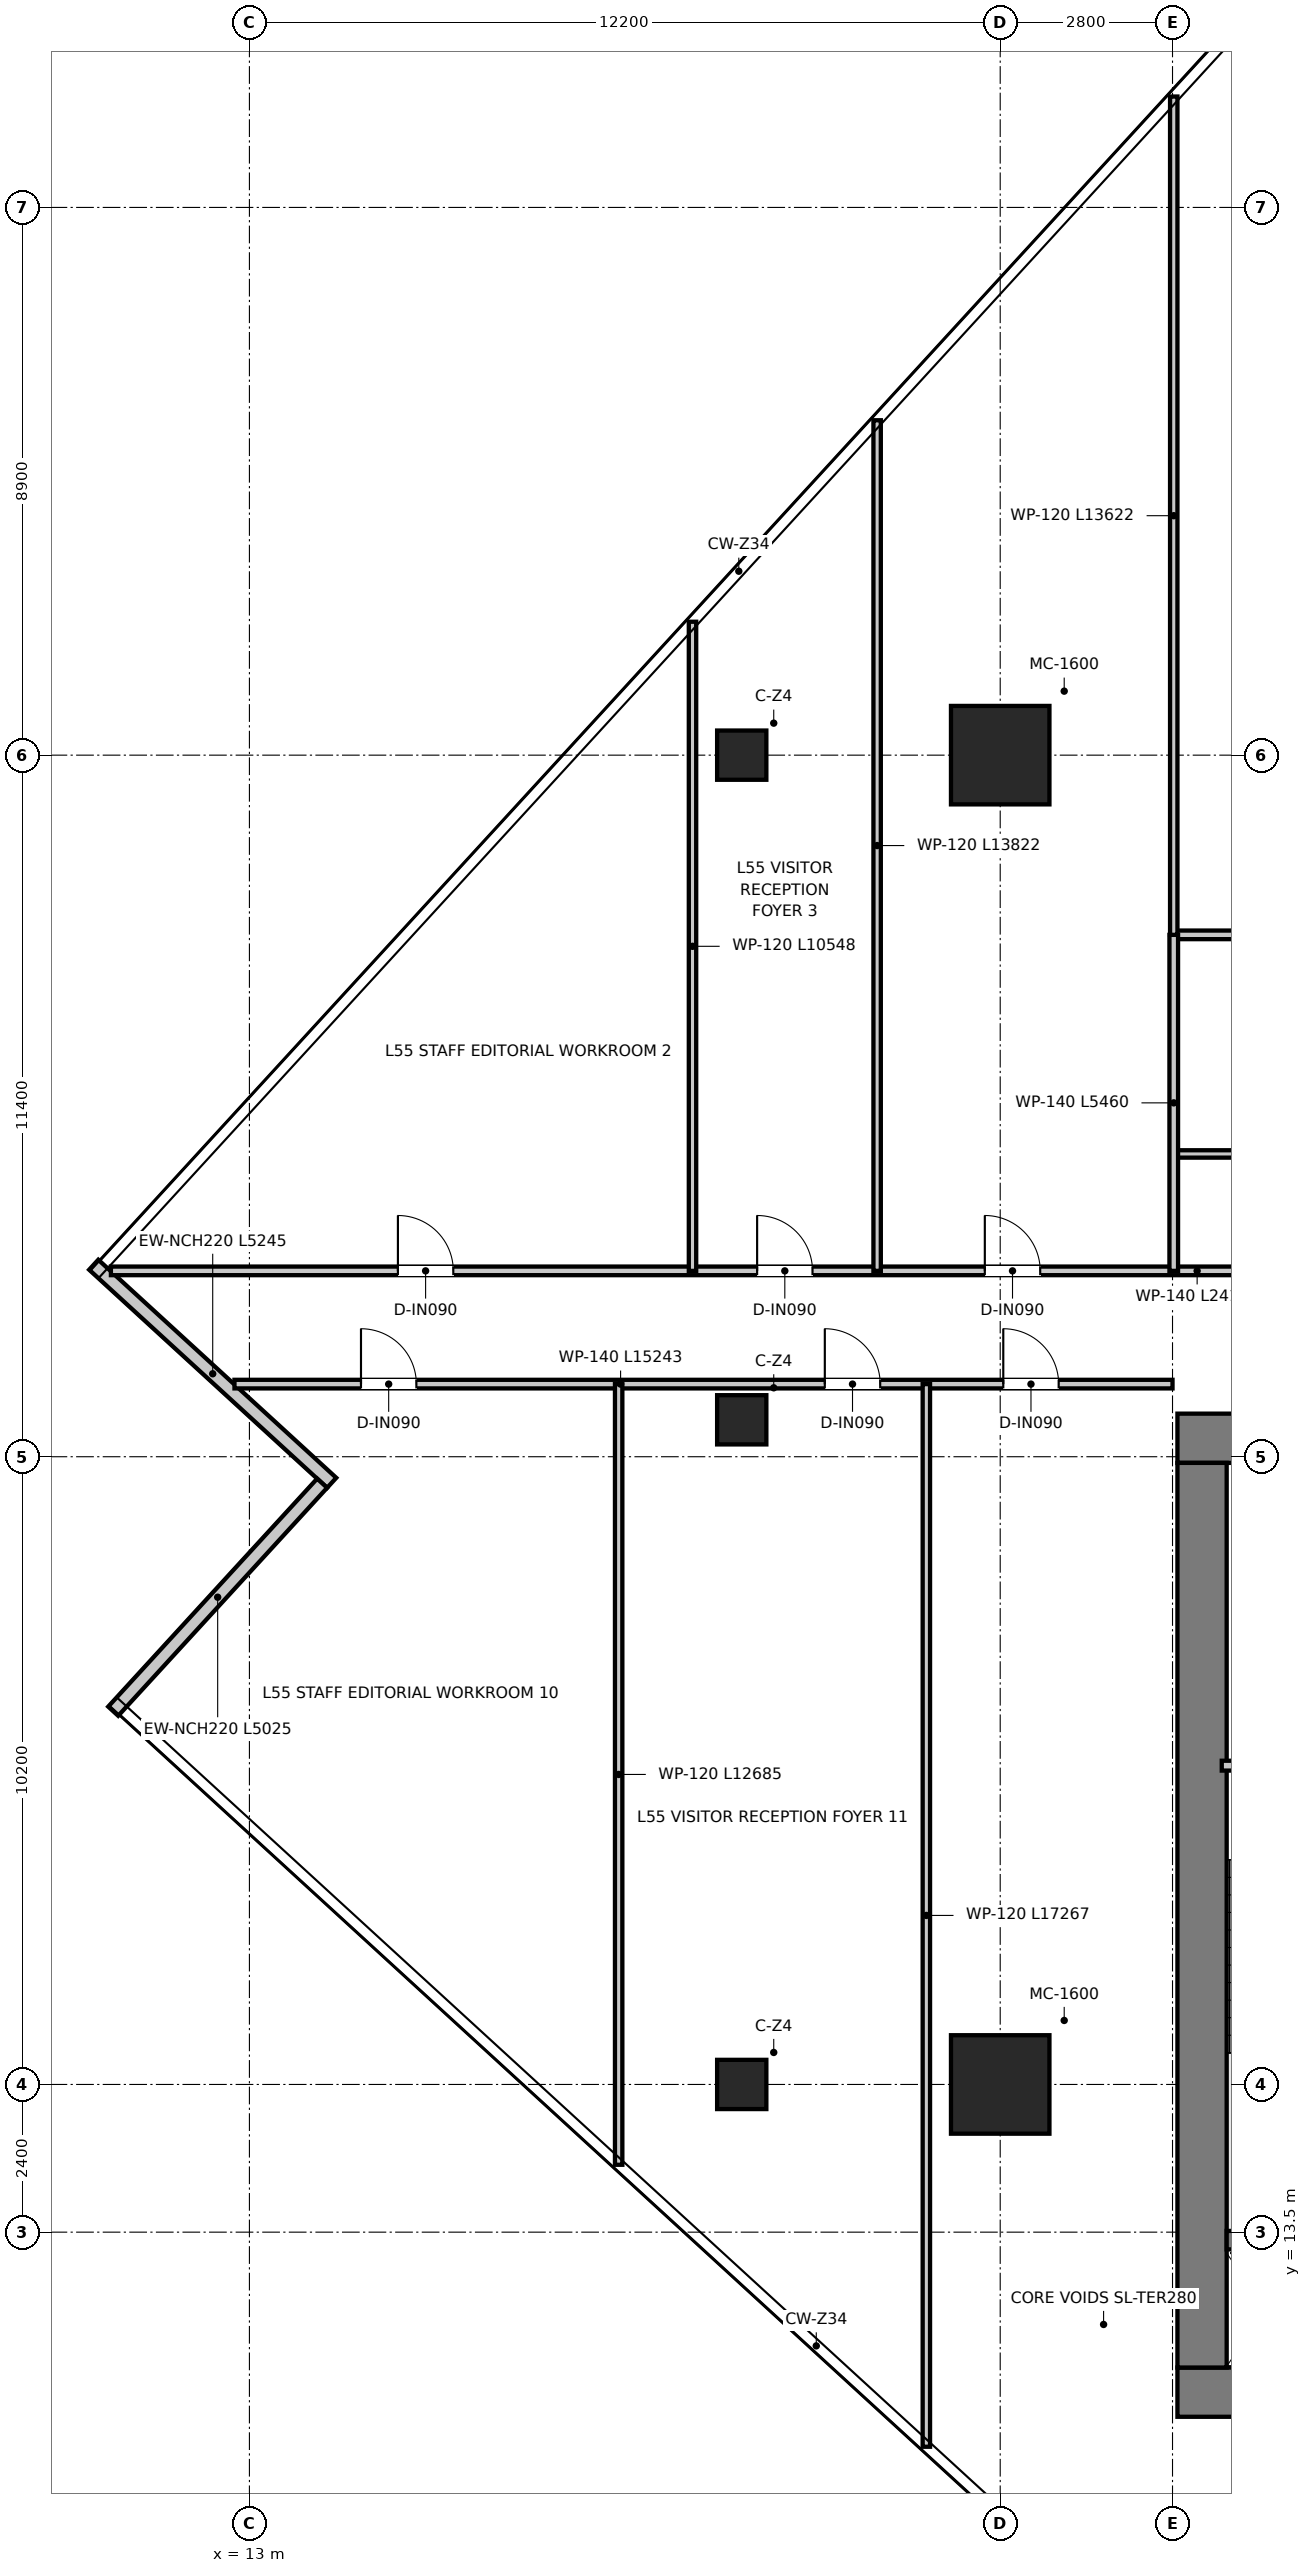
"""IFC4 building model, lengths in metres.
Left out: names, types, materials, properties, quantities, classifications, styles, units other than length and angle.
Written with IfcOpenShell. Run it as: python <this file> out.ifc"""

import sys

from ifc_helpers import new_model, si_unit, direction, frame, frame_2d, origin, origin_2d, place, context, subcontext, project, spatial, rectangle, extrude, source, transform, mapped, element, fill, save


model = new_model("IFC4")
c1 = context("Model", 3, precision=1e-05, world=origin(), true_north=direction((0.0, 1.0)))
c2 = subcontext(c1, "Body", "Model", "MODEL_VIEW")
j1 = project(units=[si_unit("LENGTHUNIT", "METRE"), si_unit("PLANEANGLEUNIT", "RADIAN")], contexts=[c1])
p1 = place(None, origin())
s1 = spatial("IfcSite", under=j1, at=p1, CompositionType="ELEMENT")
p2 = place(p1, origin())
s2 = spatial("IfcBuilding", under=s1, at=p2, CompositionType="ELEMENT")
p3 = place(p2, frame((0.0, 0.0, 227.05)))
s3 = spatial("IfcBuildingStorey", under=s2, at=p3, CompositionType="ELEMENT", Elevation=227.05)
p4 = place(p3, frame((28.08, 10.9, 0.0), z_axis=(0.0, 0.0, 1.0), x_axis=(1.0, 0.0, 0.0)))
e1 = element("IfcWall", 1, at=p4, inside=s3, PredefinedType="SHEAR", context=c2, shape_type="SweptSolid", body=[
    extrude(rectangle(XDim=15.84, YDim=0.8, at=frame_2d((7.92, 0.0))), origin(), (0.0, 0.0, 1.0), 3.95),
])
p5 = place(p3, frame((28.08, 26.4, 0.0), z_axis=(0.0, 0.0, 1.0), x_axis=(1.0, 0.0, 0.0)))
e2 = element("IfcWall", 2, at=p5, inside=s3, PredefinedType="SHEAR", context=c2, shape_type="SweptSolid", body=[
    extrude(rectangle(XDim=15.84, YDim=0.8, at=frame_2d((7.92, 0.0))), origin(), (0.0, 0.0, 1.0), 3.95),
])
p6 = place(p5, frame((7.22, 0.0, 0.0)))
e3 = element("IfcOpeningElement", 3, at=p6, cuts=e2, PredefinedType="OPENING", context=c2, shape_type="SweptSolid", body=[
    extrude(rectangle(XDim=1.4, YDim=2.2, at=frame_2d((0.7, 1.1))), frame((0.0, 0.41, 0.0), z_axis=(0.0, -1.0, 0.0), x_axis=(1.0, 0.0, 0.0)), (0.0, 0.0, 1.0), 0.82),
])
p7 = place(p5, frame((1.775, 0.0, 0.0)))
e4 = element("IfcOpeningElement", 4, at=p7, cuts=e2, PredefinedType="OPENING", context=c2, shape_type="SweptSolid", body=[
    extrude(rectangle(XDim=1.05, YDim=2.1, at=frame_2d((0.525, 1.05))), frame((0.0, 0.41, 0.0), z_axis=(0.0, -1.0, 0.0), x_axis=(1.0, 0.0, 0.0)), (0.0, 0.0, 1.0), 0.82),
])
p8 = place(p5, frame((13.015, 0.0, 0.0)))
e5 = element("IfcOpeningElement", 5, at=p8, cuts=e2, PredefinedType="OPENING", context=c2, shape_type="SweptSolid", body=[
    extrude(rectangle(XDim=1.05, YDim=2.1, at=frame_2d((0.525, 1.05))), frame((0.0, 0.41, 0.0), z_axis=(0.0, -1.0, 0.0), x_axis=(1.0, 0.0, 0.0)), (0.0, 0.0, 1.0), 0.82),
])
p9 = place(p3, frame((28.48, 11.3, 0.0), z_axis=(0.0, 0.0, 1.0), x_axis=(0.0, 1.0, 0.0)))
e6 = element("IfcWall", 6, at=p9, inside=s3, PredefinedType="SHEAR", context=c2, shape_type="SweptSolid", body=[
    extrude(rectangle(XDim=14.7, YDim=0.8, at=frame_2d((7.35, 0.0))), origin(), (0.0, 0.0, 1.0), 3.95),
])
p10 = place(p3, frame((28.88, 13.37, 0.0), z_axis=(0.0, 0.0, 1.0), x_axis=(1.0, 0.0, 0.0)))
e7 = element("IfcWall", 7, at=p10, inside=s3, PredefinedType="SHEAR", context=c2, shape_type="SweptSolid", body=[
    extrude(rectangle(XDim=3.1, YDim=0.3, at=frame_2d((1.55, 0.0))), origin(), (0.0, 0.0, 1.0), 3.95),
])
m1 = source(origin(), c2, "Body", "SweptSolid", [
    extrude(rectangle(XDim=1.6, YDim=1.6, at=origin_2d()), origin(), (0.0, 0.0, 1.0), 3.95),
])
for number, where, z_axis, x_axis in (
    (8, (25.2, 15.9, 0.0), (0.0, 0.0, 1.0), (1.0, 0.0, 0.0)),
    (9, (25.2, 37.5, 0.0), (0.0, 0.0, 1.0), (1.0, 0.0, 0.0)),
):
    element("IfcColumn", number, at=place(p3, frame(where, z_axis=z_axis, x_axis=x_axis)), inside=s3, PredefinedType="USERDEFINED", context=c2, shape_type="MappedRepresentation", body=[
        mapped(m1, transform((0.0, 0.0, 0.0), x_axis=(1.0, 0.0, 0.0), y_axis=(0.0, 1.0, 0.0), z_axis=(0.0, 0.0, 1.0), scale=1.0)),
    ])
m2 = source(origin(), c2, "Body", "SweptSolid", [
    extrude(rectangle(XDim=0.8, YDim=0.8, at=origin_2d()), origin(), (0.0, 0.0, 1.0), 3.95),
])
for number, where, z_axis, x_axis in (
    (10, (21.0, 15.9, 0.0), (0.0, 0.0, 1.0), (1.0, 0.0, 0.0)),
    (11, (21.0, 26.7, 0.0), (0.0, 0.0, 1.0), (1.0, 0.0, 0.0)),
    (12, (21.0, 37.5, 0.0), (0.0, 0.0, 1.0), (1.0, 0.0, 0.0)),
):
    element("IfcColumn", number, at=place(p3, frame(where, z_axis=z_axis, x_axis=x_axis)), inside=s3, PredefinedType="COLUMN", context=c2, shape_type="MappedRepresentation", body=[
        mapped(m2, transform((0.0, 0.0, 0.0), x_axis=(1.0, 0.0, 0.0), y_axis=(0.0, 1.0, 0.0), z_axis=(0.0, 0.0, 1.0), scale=1.0)),
    ])
p11 = place(p3, frame((10.47, 29.22, 0.0), z_axis=(0.0, 0.0, 1.0), x_axis=(0.737293236511, -0.675572855727, 0.0)))
e13 = element("IfcWall", 13, at=p11, inside=s3, PredefinedType="ELEMENTEDWALL", context=c2, shape_type="SweptSolid", body=[
    extrude(rectangle(XDim=5.245, YDim=0.22, at=frame_2d((2.623, 0.0))), origin(), (0.0, 0.0, 1.0), 3.67),
])
p12 = place(p3, frame((14.182, 25.669, 0.0), z_axis=(0.0, 0.0, 1.0), x_axis=(-0.675581609375, -0.737285215553, 0.0)))
e14 = element("IfcWall", 14, at=p12, inside=s3, PredefinedType="ELEMENTEDWALL", context=c2, shape_type="SweptSolid", body=[
    extrude(rectangle(XDim=5.025, YDim=0.22, at=frame_2d((2.512, 0.0))), origin(), (0.0, 0.0, 1.0), 3.67),
])
p13 = place(p3, frame((28.8, 21.08, 0.0), z_axis=(0.0, 0.0, 1.0), x_axis=(1.0, 0.0, 0.0)))
e15 = element("IfcWall", 15, at=p13, inside=s3, PredefinedType="PARTITIONING", context=c2, shape_type="SweptSolid", body=[
    extrude(rectangle(XDim=3.16, YDim=0.16, at=frame_2d((1.58, 0.0))), origin(), (0.0, 0.0, 1.0), 3.67),
])
p14 = place(p13, frame((1.055, 0.0, 0.0)))
e16 = element("IfcOpeningElement", 16, at=p14, cuts=e15, PredefinedType="OPENING", context=c2, shape_type="SweptSolid", body=[
    extrude(rectangle(XDim=1.05, YDim=2.1, at=frame_2d((0.525, 1.05))), frame((0.0, 0.09, 0.0), z_axis=(0.0, -1.0, 0.0), x_axis=(1.0, 0.0, 0.0)), (0.0, 0.0, 1.0), 0.18),
])
p15 = place(p3, frame((10.749, 29.12, 0.0), z_axis=(0.0, 0.0, 1.0), x_axis=(1.0, 0.0, 0.0)))
e17 = element("IfcWall", 17, at=p15, inside=s3, PredefinedType="PARTITIONING", context=c2, shape_type="SweptSolid", body=[
    extrude(rectangle(XDim=24.131, YDim=0.14, at=frame_2d((12.065, 0.0))), origin(), (0.0, 0.0, 1.0), 3.03),
])
p16 = place(p15, frame((20.201, 0.0, 0.0)))
e18 = element("IfcOpeningElement", 18, at=p16, cuts=e17, PredefinedType="OPENING", context=c2, shape_type="SweptSolid", body=[
    extrude(rectangle(XDim=0.9, YDim=2.1, at=frame_2d((0.45, 1.05))), frame((0.0, 0.08, 0.0), z_axis=(0.0, -1.0, 0.0), x_axis=(1.0, 0.0, 0.0)), (0.0, 0.0, 1.0), 0.16),
])
p17 = place(p15, frame((4.664, 0.0, 0.0)))
e19 = element("IfcOpeningElement", 19, at=p17, cuts=e17, PredefinedType="OPENING", context=c2, shape_type="SweptSolid", body=[
    extrude(rectangle(XDim=0.9, YDim=2.1, at=frame_2d((0.45, 1.05))), frame((0.0, 0.08, 0.0), z_axis=(0.0, -1.0, 0.0), x_axis=(1.0, 0.0, 0.0)), (0.0, 0.0, 1.0), 0.16),
])
p18 = place(p15, frame((10.501, 0.0, 0.0)))
e20 = element("IfcOpeningElement", 20, at=p18, cuts=e17, PredefinedType="OPENING", context=c2, shape_type="SweptSolid", body=[
    extrude(rectangle(XDim=0.9, YDim=2.1, at=frame_2d((0.45, 1.05))), frame((0.0, 0.08, 0.0), z_axis=(0.0, -1.0, 0.0), x_axis=(1.0, 0.0, 0.0)), (0.0, 0.0, 1.0), 0.16),
])
p19 = place(p15, frame((14.201, 0.0, 0.0)))
e21 = element("IfcOpeningElement", 21, at=p19, cuts=e17, PredefinedType="OPENING", context=c2, shape_type="SweptSolid", body=[
    extrude(rectangle(XDim=0.9, YDim=2.1, at=frame_2d((0.45, 1.05))), frame((0.0, 0.08, 0.0), z_axis=(0.0, -1.0, 0.0), x_axis=(1.0, 0.0, 0.0)), (0.0, 0.0, 1.0), 0.16),
])
p20 = place(p3, frame((12.757, 27.28, 0.0), z_axis=(0.0, 0.0, 1.0), x_axis=(1.0, 0.0, 0.0)))
e22 = element("IfcWall", 22, at=p20, inside=s3, PredefinedType="PARTITIONING", context=c2, shape_type="SweptSolid", body=[
    extrude(rectangle(XDim=15.243, YDim=0.14, at=frame_2d((7.622, 0.0))), origin(), (0.0, 0.0, 1.0), 3.03),
])
p21 = place(p20, frame((2.056, 0.0, 0.0)))
e23 = element("IfcOpeningElement", 23, at=p21, cuts=e22, PredefinedType="OPENING", context=c2, shape_type="SweptSolid", body=[
    extrude(rectangle(XDim=0.9, YDim=2.1, at=frame_2d((0.45, 1.05))), frame((0.0, 0.08, 0.0), z_axis=(0.0, -1.0, 0.0), x_axis=(1.0, 0.0, 0.0)), (0.0, 0.0, 1.0), 0.16),
])
p22 = place(p20, frame((9.593, 0.0, 0.0)))
e24 = element("IfcOpeningElement", 24, at=p22, cuts=e22, PredefinedType="OPENING", context=c2, shape_type="SweptSolid", body=[
    extrude(rectangle(XDim=0.9, YDim=2.1, at=frame_2d((0.45, 1.05))), frame((0.0, 0.08, 0.0), z_axis=(0.0, -1.0, 0.0), x_axis=(1.0, 0.0, 0.0)), (0.0, 0.0, 1.0), 0.16),
])
p23 = place(p20, frame((12.493, 0.0, 0.0)))
e25 = element("IfcOpeningElement", 25, at=p23, cuts=e22, PredefinedType="OPENING", context=c2, shape_type="SweptSolid", body=[
    extrude(rectangle(XDim=0.9, YDim=2.1, at=frame_2d((0.45, 1.05))), frame((0.0, 0.08, 0.0), z_axis=(0.0, -1.0, 0.0), x_axis=(1.0, 0.0, 0.0)), (0.0, 0.0, 1.0), 0.16),
])
p24 = place(p3, frame((28.02, 31.02, 0.0), z_axis=(0.0, 0.0, 1.0), x_axis=(1.0, 0.0, 0.0)))
e26 = element("IfcWall", 26, at=p24, inside=s3, PredefinedType="PARTITIONING", context=c2, shape_type="SweptSolid", body=[
    extrude(rectangle(XDim=6.86, YDim=0.12, at=frame_2d((3.43, 0.0))), origin(), (0.0, 0.0, 1.0), 3.18),
])
p25 = place(p3, frame((28.02, 34.58, 0.0), z_axis=(0.0, 0.0, 1.0), x_axis=(1.0, 0.0, 0.0)))
e27 = element("IfcWall", 27, at=p25, inside=s3, PredefinedType="PARTITIONING", context=c2, shape_type="SweptSolid", body=[
    extrude(rectangle(XDim=6.86, YDim=0.14, at=frame_2d((3.43, 0.0))), origin(), (0.0, 0.0, 1.0), 3.18),
])
p26 = place(p3, frame((28.02, 29.12, 0.0), z_axis=(0.0, 0.0, 1.0), x_axis=(0.0, 1.0, 0.0)))
e28 = element("IfcWall", 28, at=p26, inside=s3, PredefinedType="PARTITIONING", context=c2, shape_type="SweptSolid", body=[
    extrude(rectangle(XDim=5.46, YDim=0.14, at=frame_2d((2.73, 0.0))), origin(), (0.0, 0.0, 1.0), 3.37),
])
p27 = place(p3, frame((20.2, 29.12, 0.0), z_axis=(0.0, 0.0, 1.0), x_axis=(0.0, 1.0, 0.0)))
e29 = element("IfcWall", 29, at=p27, inside=s3, PredefinedType="PARTITIONING", context=c2, shape_type="SweptSolid", body=[
    extrude(rectangle(XDim=10.548, YDim=0.12, at=frame_2d((5.274, 0.0))), origin(), (0.0, 0.0, 1.0), 3.67),
])
p28 = place(p3, frame((23.2, 29.12, 0.0), z_axis=(0.0, 0.0, 1.0), x_axis=(0.0, 1.0, 0.0)))
e30 = element("IfcWall", 30, at=p28, inside=s3, PredefinedType="PARTITIONING", context=c2, shape_type="SweptSolid", body=[
    extrude(rectangle(XDim=13.822, YDim=0.12, at=frame_2d((6.911, 0.0))), origin(), (0.0, 0.0, 1.0), 3.18),
])
p29 = place(p3, frame((28.02, 34.58, 0.0), z_axis=(0.0, 0.0, 1.0), x_axis=(0.0, 1.0, 0.0)))
e31 = element("IfcWall", 31, at=p29, inside=s3, PredefinedType="PARTITIONING", context=c2, shape_type="SweptSolid", body=[
    extrude(rectangle(XDim=13.622, YDim=0.12, at=frame_2d((6.811, 0.0))), origin(), (0.0, 0.0, 1.0), 3.03),
])
p30 = place(p3, frame((19.0, 14.595, 0.0), z_axis=(0.0, 0.0, 1.0), x_axis=(0.0, 1.0, 0.0)))
e32 = element("IfcWall", 32, at=p30, inside=s3, PredefinedType="PARTITIONING", context=c2, shape_type="SweptSolid", body=[
    extrude(rectangle(XDim=12.685, YDim=0.12, at=frame_2d((6.343, 0.0))), origin(), (0.0, 0.0, 1.0), 3.67),
])
p31 = place(p3, frame((24.0, 10.013, 0.0), z_axis=(0.0, 0.0, 1.0), x_axis=(0.0, 1.0, 0.0)))
e33 = element("IfcWall", 33, at=p31, inside=s3, PredefinedType="PARTITIONING", context=c2, shape_type="SweptSolid", body=[
    extrude(rectangle(XDim=17.267, YDim=0.12, at=frame_2d((8.634, 0.0))), origin(), (0.0, 0.0, 1.0), 3.18),
])
p32 = place(p17, origin())
e34 = element("IfcDoor", 34, at=p32, inside=s3, OperationType="SINGLE_SWING_LEFT", PredefinedType="DOOR", context=c2, shape_type="SweptSolid", body=[
    extrude(rectangle(XDim=0.9, YDim=2.1, at=frame_2d((0.45, 1.05))), frame((0.0, 0.025, 0.0), z_axis=(0.0, -1.0, 0.0), x_axis=(1.0, 0.0, 0.0)), (0.0, 0.0, 1.0), 0.05),
])
fill(e19, e34)
p33 = place(p18, origin())
e35 = element("IfcDoor", 35, at=p33, inside=s3, OperationType="SINGLE_SWING_LEFT", PredefinedType="DOOR", context=c2, shape_type="SweptSolid", body=[
    extrude(rectangle(XDim=0.9, YDim=2.1, at=frame_2d((0.45, 1.05))), frame((0.0, 0.025, 0.0), z_axis=(0.0, -1.0, 0.0), x_axis=(1.0, 0.0, 0.0)), (0.0, 0.0, 1.0), 0.05),
])
fill(e20, e35)
p34 = place(p19, origin())
e36 = element("IfcDoor", 36, at=p34, inside=s3, OperationType="SINGLE_SWING_LEFT", PredefinedType="DOOR", context=c2, shape_type="SweptSolid", body=[
    extrude(rectangle(XDim=0.9, YDim=2.1, at=frame_2d((0.45, 1.05))), frame((0.0, 0.025, 0.0), z_axis=(0.0, -1.0, 0.0), x_axis=(1.0, 0.0, 0.0)), (0.0, 0.0, 1.0), 0.05),
])
fill(e21, e36)
p35 = place(p21, origin())
e37 = element("IfcDoor", 37, at=p35, inside=s3, OperationType="SINGLE_SWING_LEFT", PredefinedType="DOOR", context=c2, shape_type="SweptSolid", body=[
    extrude(rectangle(XDim=0.9, YDim=2.1, at=frame_2d((0.45, 1.05))), frame((0.0, 0.025, 0.0), z_axis=(0.0, -1.0, 0.0), x_axis=(1.0, 0.0, 0.0)), (0.0, 0.0, 1.0), 0.05),
])
fill(e23, e37)
p36 = place(p22, origin())
e38 = element("IfcDoor", 38, at=p36, inside=s3, OperationType="SINGLE_SWING_LEFT", PredefinedType="DOOR", context=c2, shape_type="SweptSolid", body=[
    extrude(rectangle(XDim=0.9, YDim=2.1, at=frame_2d((0.45, 1.05))), frame((0.0, 0.025, 0.0), z_axis=(0.0, -1.0, 0.0), x_axis=(1.0, 0.0, 0.0)), (0.0, 0.0, 1.0), 0.05),
])
fill(e24, e38)
p37 = place(p23, origin())
e39 = element("IfcDoor", 39, at=p37, inside=s3, OperationType="SINGLE_SWING_LEFT", PredefinedType="DOOR", context=c2, shape_type="SweptSolid", body=[
    extrude(rectangle(XDim=0.9, YDim=2.1, at=frame_2d((0.45, 1.05))), frame((0.0, 0.025, 0.0), z_axis=(0.0, -1.0, 0.0), x_axis=(1.0, 0.0, 0.0)), (0.0, 0.0, 1.0), 0.05),
])
fill(e25, e39)
save(model, sys.argv[1])
